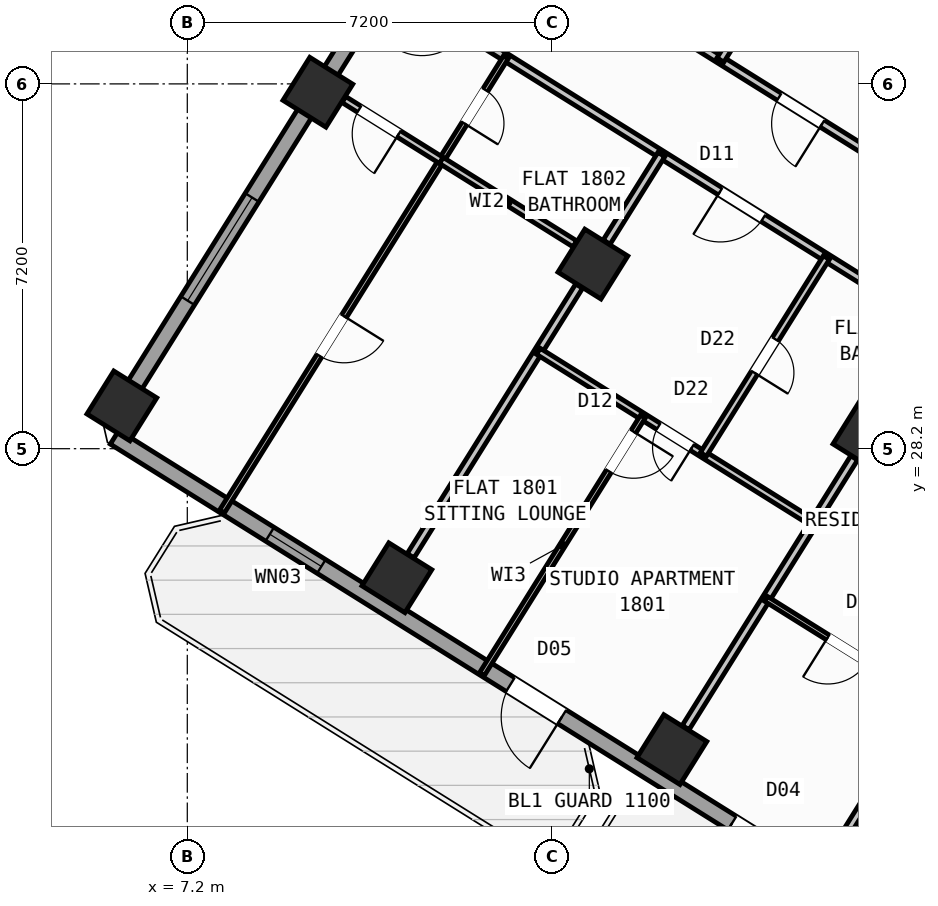
"""IFC4 building model, lengths in metres.
Left out: names, types, materials, properties, quantities, classifications, styles, units other than length and angle.
Written with IfcOpenShell. Run it as: python <this file> out.ifc"""

import sys

from ifc_helpers import new_model, si_unit, direction, frame, frame_2d, origin, origin_2d, place, context, subcontext, project, spatial, rectangle, hollow_rectangle, extrude, source, transform, mapped, element, fill, save


model = new_model("IFC4")
c1 = context("Model", 3, precision=1e-05, world=origin(), true_north=direction((0.0, 1.0)))
c2 = subcontext(c1, "Body", "Model", "MODEL_VIEW")
j1 = project(units=[si_unit("LENGTHUNIT", "METRE"), si_unit("PLANEANGLEUNIT", "RADIAN")], contexts=[c1])
p1 = place(None, origin())
s1 = spatial("IfcSite", under=j1, at=p1, CompositionType="ELEMENT")
p2 = place(p1, origin())
s2 = spatial("IfcBuilding", under=s1, at=p2, CompositionType="ELEMENT")
p3 = place(p2, frame((0.0, 0.0, 71.7)))
s3 = spatial("IfcBuildingStorey", under=s2, at=p3, CompositionType="ELEMENT", Elevation=71.7)
m1 = source(origin(), c2, "Body", "SweptSolid", [
    extrude(hollow_rectangle(XDim=1.0, YDim=1.0, WallThickness=0.04, at=origin_2d()), origin(), (0.0, 0.0, 1.0), 4.8),
])
for number, where, z_axis, x_axis in (
    (1, (20.632, 28.452, 0.0), (0.0, 0.0, 1.0), (-0.848, 0.53, 0.0)),
    (2, (16.764, 22.261, 0.0), (0.0, 0.0, 1.0), (-0.848, 0.53, 0.0)),
    (3, (15.205, 31.844, 0.0), (0.0, 0.0, 1.0), (-0.848, 0.53, 0.0)),
    (4, (11.336, 25.653, 0.0), (0.0, 0.0, 1.0), (-0.848, 0.53, 0.0)),
    (5, (9.777, 35.235, 0.0), (0.0, 0.0, 1.0), (-0.848, 0.53, 0.0)),
    (6, (5.909, 29.044, 0.0), (0.0, 0.0, 1.0), (-0.848, 0.53, 0.0)),
):
    element("IfcColumn", number, at=place(p3, frame(where, z_axis=z_axis, x_axis=x_axis)), inside=s3, PredefinedType="COLUMN", context=c2, shape_type="MappedRepresentation", body=[
        mapped(m1, transform((0.0, 0.0, 0.0), scale=1.0)),
    ])
p4 = place(p3, frame((31.76, 12.183, 0.0), z_axis=(0.0, 0.0, 1.0), x_axis=(-0.848047074256, 0.529920899612, 0.0)))
e7 = element("IfcWall", 7, at=p4, inside=s3, PredefinedType="STANDARD", context=c2, shape_type="SweptSolid", body=[
    extrude(rectangle(XDim=30.652, YDim=0.32, at=frame_2d((15.326, 0.0))), origin(), (0.0, 0.0, 1.0), 4.52),
])
p5 = place(p4, frame((20.241, 0.0, 0.0)))
e8 = element("IfcOpeningElement", 8, at=p5, cuts=e7, PredefinedType="OPENING", context=c2, shape_type="SweptSolid", body=[
    extrude(rectangle(XDim=1.2, YDim=2.15, at=frame_2d((0.6, 1.075))), frame((0.0, 0.17, 0.0), z_axis=(0.0, -1.0, 0.0), x_axis=(1.0, 0.0, 0.0)), (0.0, 0.0, 1.0), 0.34),
])
p6 = place(p4, frame((14.781, 0.0, 0.0)))
e9 = element("IfcOpeningElement", 9, at=p6, cuts=e7, PredefinedType="OPENING", context=c2, shape_type="SweptSolid", body=[
    extrude(rectangle(XDim=1.5, YDim=2.25, at=frame_2d((0.75, 1.125))), frame((0.0, 0.17, 0.0), z_axis=(0.0, -1.0, 0.0), x_axis=(1.0, 0.0, 0.0)), (0.0, 0.0, 1.0), 0.34),
])
p7 = place(p4, frame((1.84, 0.0, 0.75)))
e10 = element("IfcOpeningElement", 10, at=p7, cuts=e7, PredefinedType="OPENING", context=c2, shape_type="SweptSolid", body=[
    extrude(rectangle(XDim=2.4, YDim=1.6, at=frame_2d((1.2, 0.8))), frame((0.0, 0.17, 0.0), z_axis=(0.0, -1.0, 0.0), x_axis=(1.0, 0.0, 0.0)), (0.0, 0.0, 1.0), 0.34),
])
p8 = place(p4, frame((7.019, 0.0, 0.75)))
e11 = element("IfcOpeningElement", 11, at=p8, cuts=e7, PredefinedType="OPENING", context=c2, shape_type="SweptSolid", body=[
    extrude(rectangle(XDim=2.4, YDim=1.6, at=frame_2d((1.2, 0.8))), frame((0.0, 0.17, 0.0), z_axis=(0.0, -1.0, 0.0), x_axis=(1.0, 0.0, 0.0)), (0.0, 0.0, 1.0), 0.34),
])
p9 = place(p4, frame((25.841, 0.0, 0.95)))
e12 = element("IfcOpeningElement", 12, at=p9, cuts=e7, PredefinedType="OPENING", context=c2, shape_type="SweptSolid", body=[
    extrude(rectangle(XDim=1.2, YDim=1.4, at=frame_2d((0.6, 0.7))), frame((0.0, 0.17, 0.0), z_axis=(0.0, -1.0, 0.0), x_axis=(1.0, 0.0, 0.0)), (0.0, 0.0, 1.0), 0.34),
])
p10 = place(p3, frame((5.7, 28.71, 0.0), z_axis=(0.0, 0.0, 1.0), x_axis=(0.529923711467, 0.8480453172, 0.0)))
e13 = element("IfcWall", 13, at=p10, inside=s3, PredefinedType="STANDARD", context=c2, shape_type="SweptSolid", body=[
    extrude(rectangle(XDim=21.587, YDim=0.32, at=frame_2d((10.794, 0.0))), origin(), (0.0, 0.0, 1.0), 3.895),
])
p11 = place(p10, frame((2.844, 0.0, 0.75)))
e14 = element("IfcOpeningElement", 14, at=p11, cuts=e13, PredefinedType="OPENING", context=c2, shape_type="SweptSolid", body=[
    extrude(rectangle(XDim=2.4, YDim=1.6, at=frame_2d((1.2, 0.8))), frame((0.0, 0.17, 0.0), z_axis=(0.0, -1.0, 0.0), x_axis=(1.0, 0.0, 0.0)), (0.0, 0.0, 1.0), 0.34),
])
p12 = place(p3, frame((17.424, 47.083, 0.0), z_axis=(0.0, 0.0, 1.0), x_axis=(0.848049927979, -0.529916332693, 0.0)))
e15 = element("IfcWall", 15, at=p12, inside=s3, PredefinedType="STANDARD", context=c2, shape_type="SweptSolid", body=[
    extrude(rectangle(XDim=29.223, YDim=0.32, at=frame_2d((14.612, 0.0))), origin(), (0.0, 0.0, 1.0), 4.52),
])
p13 = place(p12, frame((3.339, 0.0, 0.0)))
e16 = element("IfcOpeningElement", 16, at=p13, cuts=e15, PredefinedType="OPENING", context=c2, shape_type="SweptSolid", body=[
    extrude(rectangle(XDim=1.05, YDim=2.15, at=frame_2d((0.525, 1.075))), frame((0.0, 0.17, 0.0), z_axis=(0.0, -1.0, 0.0), x_axis=(1.0, 0.0, 0.0)), (0.0, 0.0, 1.0), 0.34),
])
p14 = place(p12, frame((8.194, 0.0, 0.75)))
e17 = element("IfcOpeningElement", 17, at=p14, cuts=e15, PredefinedType="OPENING", context=c2, shape_type="SweptSolid", body=[
    extrude(rectangle(XDim=2.4, YDim=1.6, at=frame_2d((1.2, 0.8))), frame((0.0, 0.17, 0.0), z_axis=(0.0, -1.0, 0.0), x_axis=(1.0, 0.0, 0.0)), (0.0, 0.0, 1.0), 0.34),
])
p15 = place(p12, frame((22.226, 0.0, 0.85)))
e18 = element("IfcOpeningElement", 18, at=p15, cuts=e15, PredefinedType="OPENING", context=c2, shape_type="SweptSolid", body=[
    extrude(rectangle(XDim=1.8, YDim=1.5, at=frame_2d((0.9, 0.75))), frame((0.0, 0.17, 0.0), z_axis=(0.0, -1.0, 0.0), x_axis=(1.0, 0.0, 0.0)), (0.0, 0.0, 1.0), 0.34),
])
p16 = place(p12, frame((26.934, 0.0, 0.95)))
e19 = element("IfcOpeningElement", 19, at=p16, cuts=e15, PredefinedType="OPENING", context=c2, shape_type="SweptSolid", body=[
    extrude(rectangle(XDim=1.2, YDim=1.4, at=frame_2d((0.6, 0.7))), frame((0.0, 0.17, 0.0), z_axis=(0.0, -1.0, 0.0), x_axis=(1.0, 0.0, 0.0)), (0.0, 0.0, 1.0), 0.34),
])
p17 = place(p12, frame((14.636, 0.0, 1.0)))
e20 = element("IfcOpeningElement", 20, at=p17, cuts=e15, PredefinedType="OPENING", context=c2, shape_type="SweptSolid", body=[
    extrude(rectangle(XDim=0.9, YDim=1.25, at=frame_2d((0.45, 0.625))), frame((0.0, 0.17, 0.0), z_axis=(0.0, -1.0, 0.0), x_axis=(1.0, 0.0, 0.0)), (0.0, 0.0, 1.0), 0.34),
])
p18 = place(p3, frame((25.198, 28.606, 0.0), z_axis=(0.0, 0.0, 1.0), x_axis=(-0.529926497642, -0.848043576178, 0.0)))
e21 = element("IfcWall", 21, at=p18, inside=s3, PredefinedType="PARTITIONING", context=c2, shape_type="SweptSolid", body=[
    extrude(rectangle(XDim=10.3, YDim=0.16, at=frame_2d((5.15, 0.0))), origin(), (0.0, 0.0, 1.0), 4.51),
])
p19 = place(p3, frame((26.363, 30.472, 0.0), z_axis=(0.0, 0.0, 1.0), x_axis=(-0.848052408131, 0.529912363569, 0.0)))
e22 = element("IfcWall", 22, at=p19, inside=s3, PredefinedType="PARTITIONING", context=c2, shape_type="SweptSolid", body=[
    extrude(rectangle(XDim=16.73, YDim=0.16, at=frame_2d((8.365, 0.0))), origin(), (0.0, 0.0, 1.0), 4.51),
])
p20 = place(p19, frame((2.22, 0.0, 0.0)))
e23 = element("IfcOpeningElement", 23, at=p20, cuts=e22, PredefinedType="OPENING", context=c2, shape_type="SweptSolid", body=[
    extrude(rectangle(XDim=0.86, YDim=2.05, at=frame_2d((0.43, 1.025))), frame((0.0, 0.09, 0.0), z_axis=(0.0, -1.0, 0.0), x_axis=(1.0, 0.0, 0.0)), (0.0, 0.0, 1.0), 0.18),
])
p21 = place(p19, frame((7.82, 0.0, 0.0)))
e24 = element("IfcOpeningElement", 24, at=p21, cuts=e22, PredefinedType="OPENING", context=c2, shape_type="SweptSolid", body=[
    extrude(rectangle(XDim=1.0, YDim=2.1, at=frame_2d((0.5, 1.05))), frame((0.0, 0.09, 0.0), z_axis=(0.0, -1.0, 0.0), x_axis=(1.0, 0.0, 0.0)), (0.0, 0.0, 1.0), 0.18),
])
p22 = place(p19, frame((12.95, 0.0, 0.0)))
e25 = element("IfcOpeningElement", 25, at=p22, cuts=e22, PredefinedType="OPENING", context=c2, shape_type="SweptSolid", body=[
    extrude(rectangle(XDim=1.0, YDim=2.1, at=frame_2d((0.5, 1.05))), frame((0.0, 0.09, 0.0), z_axis=(0.0, -1.0, 0.0), x_axis=(1.0, 0.0, 0.0)), (0.0, 0.0, 1.0), 0.18),
])
p23 = place(p3, frame((25.198, 28.606, 0.0), z_axis=(0.0, 0.0, 1.0), x_axis=(-0.848052408131, 0.529912363569, 0.0)))
e26 = element("IfcWall", 26, at=p23, inside=s3, PredefinedType="PARTITIONING", context=c2, shape_type="SweptSolid", body=[
    extrude(rectangle(XDim=16.73, YDim=0.16, at=frame_2d((8.365, 0.0))), origin(), (0.0, 0.0, 1.0), 4.51),
])
p24 = place(p23, frame((1.395, 0.0, 0.0)))
e27 = element("IfcOpeningElement", 27, at=p24, cuts=e26, PredefinedType="OPENING", context=c2, shape_type="SweptSolid", body=[
    extrude(rectangle(XDim=1.0, YDim=2.1, at=frame_2d((0.5, 1.05))), frame((0.0, 0.09, 0.0), z_axis=(0.0, -1.0, 0.0), x_axis=(1.0, 0.0, 0.0)), (0.0, 0.0, 1.0), 0.18),
])
p25 = place(p23, frame((7.82, 0.0, 0.0)))
e28 = element("IfcOpeningElement", 28, at=p25, cuts=e26, PredefinedType="OPENING", context=c2, shape_type="SweptSolid", body=[
    extrude(rectangle(XDim=1.0, YDim=2.1, at=frame_2d((0.5, 1.05))), frame((0.0, 0.09, 0.0), z_axis=(0.0, -1.0, 0.0), x_axis=(1.0, 0.0, 0.0)), (0.0, 0.0, 1.0), 0.18),
])
p26 = place(p23, frame((14.76, 0.0, 0.0)))
e29 = element("IfcOpeningElement", 29, at=p26, cuts=e26, PredefinedType="OPENING", context=c2, shape_type="SweptSolid", body=[
    extrude(rectangle(XDim=1.0, YDim=2.1, at=frame_2d((0.5, 1.05))), frame((0.0, 0.09, 0.0), z_axis=(0.0, -1.0, 0.0), x_axis=(1.0, 0.0, 0.0)), (0.0, 0.0, 1.0), 0.18),
])
p27 = place(p3, frame((20.361, 28.018, 0.0), z_axis=(0.0, 0.0, 1.0), x_axis=(-0.529915015264, -0.848050751193, 0.0)))
e30 = element("IfcWall", 30, at=p27, inside=s3, PredefinedType="PARTITIONING", context=c2, shape_type="SweptSolid", body=[
    extrude(rectangle(XDim=6.276, YDim=0.16, at=frame_2d((3.138, 0.0))), origin(), (0.0, 0.0, 1.0), 3.895),
])
p28 = place(p3, frame((21.837, 23.228, 0.0), z_axis=(0.0, 0.0, 1.0), x_axis=(-0.84803087207, 0.529946827537, 0.0)))
e31 = element("IfcWall", 31, at=p28, inside=s3, PredefinedType="PARTITIONING", context=c2, shape_type="SweptSolid", body=[
    extrude(rectangle(XDim=3.79, YDim=0.11, at=frame_2d((1.895, 0.0))), origin(), (0.0, 0.0, 1.0), 4.51),
])
p29 = place(p28, frame((1.435, 0.0, 0.0)))
e32 = element("IfcOpeningElement", 32, at=p29, cuts=e31, PredefinedType="OPENING", context=c2, shape_type="SweptSolid", body=[
    extrude(rectangle(XDim=0.92, YDim=2.08, at=frame_2d((0.46, 1.04))), frame((0.0, 0.065, 0.0), z_axis=(0.0, -1.0, 0.0), x_axis=(1.0, 0.0, 0.0)), (0.0, 0.0, 1.0), 0.13),
])
p30 = place(p3, frame((16.556, 34.006, 0.0), z_axis=(0.0, 0.0, 1.0), x_axis=(-0.529966635742, -0.848018493313, 0.0)))
e33 = element("IfcWall", 33, at=p30, inside=s3, PredefinedType="PARTITIONING", context=c2, shape_type="SweptSolid", body=[
    extrude(rectangle(XDim=2.038, YDim=0.16, at=frame_2d((1.019, 0.0))), origin(), (0.0, 0.0, 1.0), 3.895),
])
p31 = place(p3, frame((14.933, 31.409, 0.0), z_axis=(0.0, 0.0, 1.0), x_axis=(-0.529897533635, -0.848061674554, 0.0)))
e34 = element("IfcWall", 34, at=p31, inside=s3, PredefinedType="PARTITIONING", context=c2, shape_type="SweptSolid", body=[
    extrude(rectangle(XDim=6.276, YDim=0.16, at=frame_2d((3.138, 0.0))), origin(), (0.0, 0.0, 1.0), 3.895),
])
p32 = place(p3, frame((19.556, 26.73, 0.0), z_axis=(0.0, 0.0, 1.0), x_axis=(-0.848049732085, 0.529916646191, 0.0)))
e35 = element("IfcWall", 35, at=p32, inside=s3, PredefinedType="PLUMBINGWALL", context=c2, shape_type="SweptSolid", body=[
    extrude(rectangle(XDim=6.4, YDim=0.14, at=frame_2d((3.2, 0.0))), origin(), (0.0, 0.0, 1.0), 4.51),
])
p33 = place(p32, frame((2.824, 0.0, 0.0)))
e36 = element("IfcOpeningElement", 36, at=p33, cuts=e35, PredefinedType="OPENING", context=c2, shape_type="SweptSolid", body=[
    extrude(rectangle(XDim=0.78, YDim=2.05, at=frame_2d((0.39, 1.025))), frame((0.0, 0.08, 0.0), z_axis=(0.0, -1.0, 0.0), x_axis=(1.0, 0.0, 0.0)), (0.0, 0.0, 1.0), 0.16),
])
p34 = place(p3, frame((19.812, 31.971, 0.0), z_axis=(0.0, 0.0, 1.0), x_axis=(-0.529917480809, -0.848049210561, 0.0)))
e37 = element("IfcWall", 37, at=p34, inside=s3, PredefinedType="PLUMBINGWALL", context=c2, shape_type="SweptSolid", body=[
    extrude(rectangle(XDim=4.58, YDim=0.14, at=frame_2d((2.29, 0.0))), origin(), (0.0, 0.0, 1.0), 4.51),
])
p35 = place(p34, frame((1.9, 0.0, 0.0)))
e38 = element("IfcOpeningElement", 38, at=p35, cuts=e37, PredefinedType="OPENING", context=c2, shape_type="SweptSolid", body=[
    extrude(rectangle(XDim=0.78, YDim=2.05, at=frame_2d((0.39, 1.025))), frame((0.0, 0.08, 0.0), z_axis=(0.0, -1.0, 0.0), x_axis=(1.0, 0.0, 0.0)), (0.0, 0.0, 1.0), 0.16),
])
p36 = place(p3, frame((16.191, 28.833, 0.0), z_axis=(0.0, 0.0, 1.0), x_axis=(-0.529900017123, -0.848060122782, 0.0)))
e39 = element("IfcWall", 39, at=p36, inside=s3, PredefinedType="PARTITIONING", context=c2, shape_type="SweptSolid", body=[
    extrude(rectangle(XDim=5.99, YDim=0.11, at=frame_2d((2.995, 0.0))), origin(), (0.0, 0.0, 1.0), 4.51),
])
p37 = place(p36, frame((0.35, 0.0, 0.0)))
e40 = element("IfcOpeningElement", 40, at=p37, cuts=e39, PredefinedType="OPENING", context=c2, shape_type="SweptSolid", body=[
    extrude(rectangle(XDim=0.92, YDim=2.08, at=frame_2d((0.46, 1.04))), frame((0.0, 0.065, 0.0), z_axis=(0.0, -1.0, 0.0), x_axis=(1.0, 0.0, 0.0)), (0.0, 0.0, 1.0), 0.13),
])
p38 = place(p3, frame((13.486, 35.924, 0.0), z_axis=(0.0, 0.0, 1.0), x_axis=(-0.529924195719, -0.848045014602, 0.0)))
e41 = element("IfcWall", 41, at=p38, inside=s3, PredefinedType="PARTITIONING", context=c2, shape_type="SweptSolid", body=[
    extrude(rectangle(XDim=10.57, YDim=0.11, at=frame_2d((5.285, 0.0))), origin(), (0.0, 0.0, 1.0), 4.51),
])
p39 = place(p38, frame((0.76, 0.0, 0.0)))
e42 = element("IfcOpeningElement", 42, at=p39, cuts=e41, PredefinedType="OPENING", context=c2, shape_type="SweptSolid", body=[
    extrude(rectangle(XDim=0.78, YDim=2.05, at=frame_2d((0.39, 1.025))), frame((0.0, 0.065, 0.0), z_axis=(0.0, -1.0, 0.0), x_axis=(1.0, 0.0, 0.0)), (0.0, 0.0, 1.0), 0.13),
])
p40 = place(p38, frame((6.025, 0.0, 0.0)))
e43 = element("IfcOpeningElement", 43, at=p40, cuts=e41, PredefinedType="OPENING", context=c2, shape_type="SweptSolid", body=[
    extrude(rectangle(XDim=0.92, YDim=2.08, at=frame_2d((0.46, 1.04))), frame((0.0, 0.065, 0.0), z_axis=(0.0, -1.0, 0.0), x_axis=(1.0, 0.0, 0.0)), (0.0, 0.0, 1.0), 0.13),
])
p41 = place(p3, frame((12.214, 33.889, 0.0), z_axis=(0.0, 0.0, 1.0), x_axis=(-0.848082963347, 0.529863460979, 0.0)))
e44 = element("IfcWall", 44, at=p41, inside=s3, PredefinedType="PLUMBINGWALL", context=c2, shape_type="SweptSolid", body=[
    extrude(rectangle(XDim=2.268, YDim=0.14, at=frame_2d((1.134, 0.0))), origin(), (0.0, 0.0, 1.0), 3.895),
])
p42 = place(p41, frame((0.99, 0.0, 0.0)))
e45 = element("IfcOpeningElement", 45, at=p42, cuts=e44, PredefinedType="OPENING", context=c2, shape_type="SweptSolid", body=[
    extrude(rectangle(XDim=0.92, YDim=2.08, at=frame_2d((0.46, 1.04))), frame((0.0, 0.08, 0.0), z_axis=(0.0, -1.0, 0.0), x_axis=(1.0, 0.0, 0.0)), (0.0, 0.0, 1.0), 0.16),
])
p43 = place(p3, frame((14.85, 32.242, 0.0), z_axis=(0.0, 0.0, 1.0), x_axis=(-0.848051256418, 0.529914206724, 0.0)))
e46 = element("IfcWall", 46, at=p43, inside=s3, PredefinedType="PLUMBINGWALL", context=c2, shape_type="SweptSolid", body=[
    extrude(rectangle(XDim=3.108, YDim=0.14, at=frame_2d((1.554, 0.0))), origin(), (0.0, 0.0, 1.0), 3.895),
])
p44 = place(p3, frame((18.802, 37.6, 0.0), z_axis=(0.0, 0.0, 1.0), x_axis=(-0.529880479764, -0.848072330149, 0.0)))
e47 = element("IfcWall", 47, at=p44, inside=s3, PredefinedType="PARTITIONING", context=c2, shape_type="SweptSolid", body=[
    extrude(rectangle(XDim=2.038, YDim=0.16, at=frame_2d((1.019, 0.0))), origin(), (0.0, 0.0, 1.0), 3.895),
])
m2 = source(origin(), c2, "Body", "SweptSolid", [
    extrude(rectangle(XDim=1.2, YDim=2.15, at=frame_2d((0.6, 1.075))), frame((0.0, 0.025, 0.0), z_axis=(0.0, -1.0, 0.0), x_axis=(1.0, 0.0, 0.0)), (0.0, 0.0, 1.0), 0.05),
])
p45 = place(p5, origin())
e48 = element("IfcDoor", 48, at=p45, inside=s3, OperationType="SINGLE_SWING_LEFT", PredefinedType="DOOR", context=c2, shape_type="MappedRepresentation", body=[
    mapped(m2, transform((0.0, 0.0, 0.0), scale=1.0)),
])
fill(e8, e48)
m3 = source(origin(), c2, "Body", "SweptSolid", [
    extrude(rectangle(XDim=1.5, YDim=2.25, at=frame_2d((0.75, 1.125))), frame((0.0, 0.025, 0.0), z_axis=(0.0, -1.0, 0.0), x_axis=(1.0, 0.0, 0.0)), (0.0, 0.0, 1.0), 0.05),
])
p46 = place(p6, origin())
e49 = element("IfcDoor", 49, at=p46, inside=s3, OperationType="DOUBLE_DOOR_SINGLE_SWING", PredefinedType="DOOR", context=c2, shape_type="MappedRepresentation", body=[
    mapped(m3, transform((0.0, 0.0, 0.0), scale=1.0)),
])
fill(e9, e49)
m4 = source(origin(), c2, "Body", "SweptSolid", [
    extrude(rectangle(XDim=1.2, YDim=1.4, at=frame_2d((0.6, 0.7))), frame((0.0, 0.03, 0.0), z_axis=(0.0, -1.0, 0.0), x_axis=(1.0, 0.0, 0.0)), (0.0, 0.0, 1.0), 0.06),
])
p47 = place(p9, origin())
e50 = element("IfcWindow", 50, at=p47, inside=s3, PartitioningType="SINGLE_PANEL", PredefinedType="WINDOW", context=c2, shape_type="MappedRepresentation", body=[
    mapped(m4, transform((0.0, 0.0, 0.0), scale=1.0)),
])
fill(e12, e50)
m5 = source(origin(), c2, "Body", "SweptSolid", [
    extrude(rectangle(XDim=2.4, YDim=1.6, at=frame_2d((1.2, 0.8))), frame((0.0, 0.03, 0.0), z_axis=(0.0, -1.0, 0.0), x_axis=(1.0, 0.0, 0.0)), (0.0, 0.0, 1.0), 0.06),
])
p48 = place(p11, origin())
e51 = element("IfcWindow", 51, at=p48, inside=s3, PartitioningType="SINGLE_PANEL", PredefinedType="WINDOW", context=c2, shape_type="MappedRepresentation", body=[
    mapped(m5, transform((0.0, 0.0, 0.0), scale=1.0)),
])
fill(e14, e51)
m6 = source(origin(), c2, "Body", "SweptSolid", [
    extrude(rectangle(XDim=0.92, YDim=2.08, at=frame_2d((0.46, 1.04))), frame((0.0, 0.025, 0.0), z_axis=(0.0, -1.0, 0.0), x_axis=(1.0, 0.0, 0.0)), (0.0, 0.0, 1.0), 0.05),
])
p49 = place(p29, origin())
e52 = element("IfcDoor", 52, at=p49, inside=s3, OperationType="SINGLE_SWING_RIGHT", PredefinedType="DOOR", context=c2, shape_type="MappedRepresentation", body=[
    mapped(m6, transform((0.0, 0.0, 0.0), scale=1.0)),
])
fill(e32, e52)
p50 = place(p37, origin())
e53 = element("IfcDoor", 53, at=p50, inside=s3, OperationType="SINGLE_SWING_LEFT", PredefinedType="DOOR", context=c2, shape_type="MappedRepresentation", body=[
    mapped(m6, transform((0.0, 0.0, 0.0), scale=1.0)),
])
fill(e40, e53)
m7 = source(origin(), c2, "Body", "SweptSolid", [
    extrude(rectangle(XDim=1.0, YDim=2.1, at=frame_2d((0.5, 1.05))), frame((0.0, 0.025, 0.0), z_axis=(0.0, -1.0, 0.0), x_axis=(1.0, 0.0, 0.0)), (0.0, 0.0, 1.0), 0.05),
])
p51 = place(p25, origin())
e54 = element("IfcDoor", 54, at=p51, inside=s3, OperationType="SINGLE_SWING_RIGHT", PredefinedType="DOOR", context=c2, shape_type="MappedRepresentation", body=[
    mapped(m7, transform((0.0, 0.0, 0.0), scale=1.0)),
])
fill(e28, e54)
m8 = source(origin(), c2, "Body", "SweptSolid", [
    extrude(rectangle(XDim=0.78, YDim=2.05, at=frame_2d((0.39, 1.025))), frame((0.0, 0.025, 0.0), z_axis=(0.0, -1.0, 0.0), x_axis=(1.0, 0.0, 0.0)), (0.0, 0.0, 1.0), 0.05),
])
p52 = place(p33, origin())
e55 = element("IfcDoor", 55, at=p52, inside=s3, OperationType="SINGLE_SWING_LEFT", PredefinedType="DOOR", context=c2, shape_type="MappedRepresentation", body=[
    mapped(m8, transform((0.0, 0.0, 0.0), scale=1.0)),
])
fill(e36, e55)
p53 = place(p35, origin())
e56 = element("IfcDoor", 56, at=p53, inside=s3, OperationType="SINGLE_SWING_RIGHT", PredefinedType="DOOR", context=c2, shape_type="MappedRepresentation", body=[
    mapped(m8, transform((0.0, 0.0, 0.0), scale=1.0)),
])
fill(e38, e56)
p54 = place(p42, origin())
e57 = element("IfcDoor", 57, at=p54, inside=s3, OperationType="SINGLE_SWING_LEFT", PredefinedType="DOOR", context=c2, shape_type="MappedRepresentation", body=[
    mapped(m6, transform((0.0, 0.0, 0.0), scale=1.0)),
])
fill(e45, e57)
p55 = place(p39, origin())
e58 = element("IfcDoor", 58, at=p55, inside=s3, OperationType="SINGLE_SWING_RIGHT", PredefinedType="DOOR", context=c2, shape_type="MappedRepresentation", body=[
    mapped(m8, transform((0.0, 0.0, 0.0), scale=1.0)),
])
fill(e42, e58)
p56 = place(p40, origin())
e59 = element("IfcDoor", 59, at=p56, inside=s3, OperationType="SINGLE_SWING_LEFT", PredefinedType="DOOR", context=c2, shape_type="MappedRepresentation", body=[
    mapped(m6, transform((0.0, 0.0, 0.0), scale=1.0)),
])
fill(e43, e59)
p57 = place(p21, origin())
e60 = element("IfcDoor", 60, at=p57, inside=s3, OperationType="SINGLE_SWING_LEFT", PredefinedType="DOOR", context=c2, shape_type="MappedRepresentation", body=[
    mapped(m7, transform((0.0, 0.0, 0.0), scale=1.0)),
])
fill(e24, e60)
save(model, sys.argv[1])
